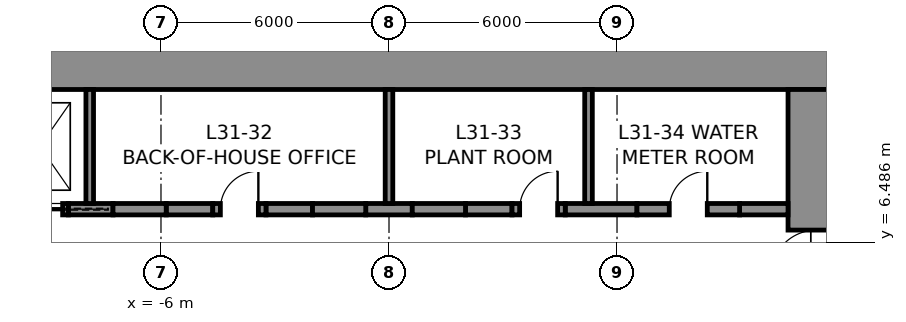
"""IFC4 building model, lengths in metres.
Left out: names, types, materials, properties, quantities, classifications, styles, units other than length and angle.
Written with IfcOpenShell. Run it as: python <this file> out.ifc"""

import sys

from ifc_helpers import new_model, si_unit, direction, frame, frame_2d, origin, place, context, subcontext, project, spatial, rectangle, extrude, element, fill, save


model = new_model("IFC4")
c1 = context("Model", 3, precision=1e-05, world=origin(), true_north=direction((0.0, 1.0)))
c2 = subcontext(c1, "Body", "Model", "MODEL_VIEW")
j1 = project(units=[si_unit("LENGTHUNIT", "METRE"), si_unit("PLANEANGLEUNIT", "RADIAN")], contexts=[c1])
p1 = place(None, origin())
s1 = spatial("IfcSite", under=j1, at=p1, CompositionType="ELEMENT")
p2 = place(p1, origin())
s2 = spatial("IfcBuilding", under=s1, at=p2, CompositionType="ELEMENT")
p3 = place(p2, frame((0.0, 0.0, 151.8)))
s3 = spatial("IfcBuildingStorey", under=s2, at=p3, CompositionType="ELEMENT", Elevation=151.8)
p4 = place(p3, frame((-12.0, 11.25, 0.0), z_axis=(0.0, 0.0, 1.0), x_axis=(1.0, 0.0, 0.0)))
e1 = element("IfcWall", 1, at=p4, inside=s3, PredefinedType="SHEAR", context=c2, shape_type="SweptSolid", body=[
    extrude(rectangle(XDim=24.0, YDim=1.5, at=frame_2d((12.0, 0.0))), origin(), (0.0, 0.0, 1.0), 4.0),
])
p5 = place(p3, frame((11.25, 10.5, 0.0), z_axis=(0.0, 0.0, 1.0), x_axis=(0.0, -1.0, 0.0)))
e2 = element("IfcWall", 2, at=p5, inside=s3, PredefinedType="SHEAR", context=c2, shape_type="SweptSolid", body=[
    extrude(rectangle(XDim=21.0, YDim=1.5, at=frame_2d((10.5, 0.0))), origin(), (0.0, 0.0, 1.0), 4.0),
])
p6 = place(p5, frame((3.7, 0.0, 0.0)))
e3 = element("IfcOpeningElement", 3, at=p6, cuts=e2, PredefinedType="OPENING", context=c2, shape_type="SweptSolid", body=[
    extrude(rectangle(XDim=1.2, YDim=2.3, at=frame_2d((0.6, 1.15))), frame((0.0, 0.76, 0.0), z_axis=(0.0, -1.0, 0.0), x_axis=(1.0, 0.0, 0.0)), (0.0, 0.0, 1.0), 1.52),
])
p7 = place(p5, frame((16.1, 0.0, 0.0)))
e4 = element("IfcOpeningElement", 4, at=p7, cuts=e2, PredefinedType="OPENING", context=c2, shape_type="SweptSolid", body=[
    extrude(rectangle(XDim=1.2, YDim=2.3, at=frame_2d((0.6, 1.15))), frame((0.0, 0.76, 0.0), z_axis=(0.0, -1.0, 0.0), x_axis=(1.0, 0.0, 0.0)), (0.0, 0.0, 1.0), 1.52),
])
p8 = place(p3, frame((-8.438, 7.35, 0.0), z_axis=(0.0, 0.0, 1.0), x_axis=(1.0, 0.0, 0.0)))
e5 = element("IfcWall", 5, at=p8, inside=s3, PredefinedType="SHEAR", context=c2, shape_type="SweptSolid", body=[
    extrude(rectangle(XDim=1.175, YDim=0.3, at=frame_2d((0.587, 0.0))), origin(), (0.0, 0.0, 1.0), 4.0),
])
for number, where, z_axis, x_axis in (
    (6, (-5.863, 7.35, 0.0), (0.0, 0.0, 1.0), (1.0, 0.0, 0.0)),
    (7, (-3.238, 7.35, 0.0), (0.0, 0.0, 1.0), (1.0, 0.0, 0.0)),
    (8, (-0.613, 7.35, 0.0), (0.0, 0.0, 1.0), (1.0, 0.0, 0.0)),
    (9, (2.012, 7.35, 0.0), (0.0, 0.0, 1.0), (1.0, 0.0, 0.0)),
):
    element("IfcWall", number, at=place(p3, frame(where, z_axis=z_axis, x_axis=x_axis)), inside=s3, PredefinedType="SHEAR", context=c2, shape_type="SweptSolid", body=[
        extrude(rectangle(XDim=1.225, YDim=0.3, at=frame_2d((0.613, 0.0))), origin(), (0.0, 0.0, 1.0), 4.0),
    ])
p9 = place(p3, frame((4.637, 7.35, 0.0), z_axis=(0.0, 0.0, 1.0), x_axis=(1.0, 0.0, 0.0)))
e10 = element("IfcWall", 10, at=p9, inside=s3, PredefinedType="SHEAR", context=c2, shape_type="SweptSolid", body=[
    extrude(rectangle(XDim=1.887, YDim=0.3, at=frame_2d((0.944, 0.0))), origin(), (0.0, 0.0, 1.0), 4.0),
])
p10 = place(p3, frame((9.225, 7.35, 0.0), z_axis=(0.0, 0.0, 1.0), x_axis=(1.0, 0.0, 0.0)))
e11 = element("IfcWall", 11, at=p10, inside=s3, PredefinedType="SHEAR", context=c2, shape_type="SweptSolid", body=[
    extrude(rectangle(XDim=1.275, YDim=0.3, at=frame_2d((0.637, 0.0))), origin(), (0.0, 0.0, 1.0), 4.0),
])
p11 = place(p3, frame((-9.938, 7.35, 0.0), z_axis=(0.0, 0.0, 1.0), x_axis=(1.0, 0.0, 0.0)))
e12 = element("IfcWall", 12, at=p11, inside=s3, PredefinedType="PARTITIONING", context=c2, shape_type="SweptSolid", body=[
    extrude(rectangle(XDim=1.5, YDim=0.3, at=frame_2d((0.75, 0.0))), origin(), (0.0, 0.0, 1.0), 4.0),
])
p12 = place(p11, frame((0.15, 0.0, 0.0)))
e13 = element("IfcOpeningElement", 13, at=p12, cuts=e12, PredefinedType="OPENING", context=c2, shape_type="SweptSolid", body=[
    extrude(rectangle(XDim=1.2, YDim=2.3, at=frame_2d((0.6, 1.15))), frame((0.0, 0.16, 0.0), z_axis=(0.0, -1.0, 0.0), x_axis=(1.0, 0.0, 0.0)), (0.0, 0.0, 1.0), 0.32),
])
p13 = place(p3, frame((-7.262, 7.35, 0.0), z_axis=(0.0, 0.0, 1.0), x_axis=(1.0, 0.0, 0.0)))
e14 = element("IfcWall", 14, at=p13, inside=s3, PredefinedType="PARTITIONING", context=c2, shape_type="SweptSolid", body=[
    extrude(rectangle(XDim=1.4, YDim=0.3, at=frame_2d((0.7, 0.0))), origin(), (0.0, 0.0, 1.0), 4.0),
])
p14 = place(p3, frame((-4.637, 7.35, 0.0), z_axis=(0.0, 0.0, 1.0), x_axis=(1.0, 0.0, 0.0)))
e15 = element("IfcWall", 15, at=p14, inside=s3, PredefinedType="PARTITIONING", context=c2, shape_type="SweptSolid", body=[
    extrude(rectangle(XDim=1.4, YDim=0.3, at=frame_2d((0.7, 0.0))), origin(), (0.0, 0.0, 1.0), 4.0),
])
p15 = place(p14, frame((0.2, 0.0, 0.0)))
e16 = element("IfcOpeningElement", 16, at=p15, cuts=e15, PredefinedType="OPENING", context=c2, shape_type="SweptSolid", body=[
    extrude(rectangle(XDim=1.0, YDim=2.3, at=frame_2d((0.5, 1.15))), frame((0.0, 0.16, 0.0), z_axis=(0.0, -1.0, 0.0), x_axis=(1.0, 0.0, 0.0)), (0.0, 0.0, 1.0), 0.32),
])
for number, where, z_axis, x_axis in (
    (17, (-2.012, 7.35, 0.0), (0.0, 0.0, 1.0), (1.0, 0.0, 0.0)),
    (18, (0.613, 7.35, 0.0), (0.0, 0.0, 1.0), (1.0, 0.0, 0.0)),
):
    element("IfcWall", number, at=place(p3, frame(where, z_axis=z_axis, x_axis=x_axis)), inside=s3, PredefinedType="PARTITIONING", context=c2, shape_type="SweptSolid", body=[
        extrude(rectangle(XDim=1.4, YDim=0.3, at=frame_2d((0.7, 0.0))), origin(), (0.0, 0.0, 1.0), 4.0),
    ])
p16 = place(p3, frame((3.238, 7.35, 0.0), z_axis=(0.0, 0.0, 1.0), x_axis=(1.0, 0.0, 0.0)))
e19 = element("IfcWall", 19, at=p16, inside=s3, PredefinedType="PARTITIONING", context=c2, shape_type="SweptSolid", body=[
    extrude(rectangle(XDim=1.4, YDim=0.3, at=frame_2d((0.7, 0.0))), origin(), (0.0, 0.0, 1.0), 4.0),
])
p17 = place(p16, frame((0.2, 0.0, 0.0)))
e20 = element("IfcOpeningElement", 20, at=p17, cuts=e19, PredefinedType="OPENING", context=c2, shape_type="SweptSolid", body=[
    extrude(rectangle(XDim=1.0, YDim=2.3, at=frame_2d((0.5, 1.15))), frame((0.0, 0.16, 0.0), z_axis=(0.0, -1.0, 0.0), x_axis=(1.0, 0.0, 0.0)), (0.0, 0.0, 1.0), 0.32),
])
p18 = place(p3, frame((6.525, 7.35, 0.0), z_axis=(0.0, 0.0, 1.0), x_axis=(1.0, 0.0, 0.0)))
e21 = element("IfcWall", 21, at=p18, inside=s3, PredefinedType="PARTITIONING", context=c2, shape_type="SweptSolid", body=[
    extrude(rectangle(XDim=2.7, YDim=0.3, at=frame_2d((1.35, 0.0))), origin(), (0.0, 0.0, 1.0), 4.0),
])
p19 = place(p18, frame((0.85, 0.0, 0.0)))
e22 = element("IfcOpeningElement", 22, at=p19, cuts=e21, PredefinedType="OPENING", context=c2, shape_type="SweptSolid", body=[
    extrude(rectangle(XDim=1.0, YDim=2.3, at=frame_2d((0.5, 1.15))), frame((0.0, 0.16, 0.0), z_axis=(0.0, -1.0, 0.0), x_axis=(1.0, 0.0, 0.0)), (0.0, 0.0, 1.0), 0.32),
])
for number, where, z_axis, x_axis in (
    (23, (-7.875, 7.5, 0.0), (0.0, 0.0, 1.0), (0.0, 1.0, 0.0)),
    (24, (0.0, 7.5, 0.0), (0.0, 0.0, 1.0), (0.0, 1.0, 0.0)),
    (25, (5.25, 7.5, 0.0), (0.0, 0.0, 1.0), (0.0, 1.0, 0.0)),
):
    element("IfcWall", number, at=place(p3, frame(where, z_axis=z_axis, x_axis=x_axis)), inside=s3, PredefinedType="PARTITIONING", context=c2, shape_type="SweptSolid", body=[
        extrude(rectangle(XDim=3.0, YDim=0.2, at=frame_2d((1.5, 0.0))), origin(), (0.0, 0.0, 1.0), 4.0),
    ])
p20 = place(p15, origin())
e26 = element("IfcDoor", 26, at=p20, inside=s3, OperationType="SINGLE_SWING_RIGHT", PredefinedType="DOOR", context=c2, shape_type="SweptSolid", body=[
    extrude(rectangle(XDim=1.0, YDim=2.3, at=frame_2d((0.5, 1.15))), frame((0.0, 0.025, 0.0), z_axis=(0.0, -1.0, 0.0), x_axis=(1.0, 0.0, 0.0)), (0.0, 0.0, 1.0), 0.05),
])
fill(e16, e26)
p21 = place(p17, origin())
e27 = element("IfcDoor", 27, at=p21, inside=s3, OperationType="SINGLE_SWING_RIGHT", PredefinedType="DOOR", context=c2, shape_type="SweptSolid", body=[
    extrude(rectangle(XDim=1.0, YDim=2.3, at=frame_2d((0.5, 1.15))), frame((0.0, 0.025, 0.0), z_axis=(0.0, -1.0, 0.0), x_axis=(1.0, 0.0, 0.0)), (0.0, 0.0, 1.0), 0.05),
])
fill(e20, e27)
p22 = place(p19, origin())
e28 = element("IfcDoor", 28, at=p22, inside=s3, OperationType="SINGLE_SWING_RIGHT", PredefinedType="DOOR", context=c2, shape_type="SweptSolid", body=[
    extrude(rectangle(XDim=1.0, YDim=2.3, at=frame_2d((0.5, 1.15))), frame((0.0, 0.025, 0.0), z_axis=(0.0, -1.0, 0.0), x_axis=(1.0, 0.0, 0.0)), (0.0, 0.0, 1.0), 0.05),
])
fill(e22, e28)
p23 = place(p6, frame((1.2, 0.0, 0.0), z_axis=(0.0, 0.0, 1.0), x_axis=(-1.0, 0.0, 0.0)))
e29 = element("IfcDoor", 29, at=p23, inside=s3, OperationType="SINGLE_SWING_LEFT", PredefinedType="DOOR", context=c2, shape_type="SweptSolid", body=[
    extrude(rectangle(XDim=1.2, YDim=2.3, at=frame_2d((0.6, 1.15))), frame((0.0, 0.025, 0.0), z_axis=(0.0, -1.0, 0.0), x_axis=(1.0, 0.0, 0.0)), (0.0, 0.0, 1.0), 0.05),
])
fill(e3, e29)
p24 = place(p12, frame((1.2, 0.0, 0.0), z_axis=(0.0, 0.0, 1.0), x_axis=(-1.0, 0.0, 0.0)))
e30 = element("IfcDoor", 30, at=p24, inside=s3, OperationType="SLIDING_TO_LEFT", PredefinedType="DOOR", context=c2, shape_type="SweptSolid", body=[
    extrude(rectangle(XDim=1.2, YDim=2.3, at=frame_2d((0.6, 1.15))), frame((0.0, 0.025, 0.0), z_axis=(0.0, -1.0, 0.0), x_axis=(1.0, 0.0, 0.0)), (0.0, 0.0, 1.0), 0.05),
])
fill(e13, e30)
save(model, sys.argv[1])
